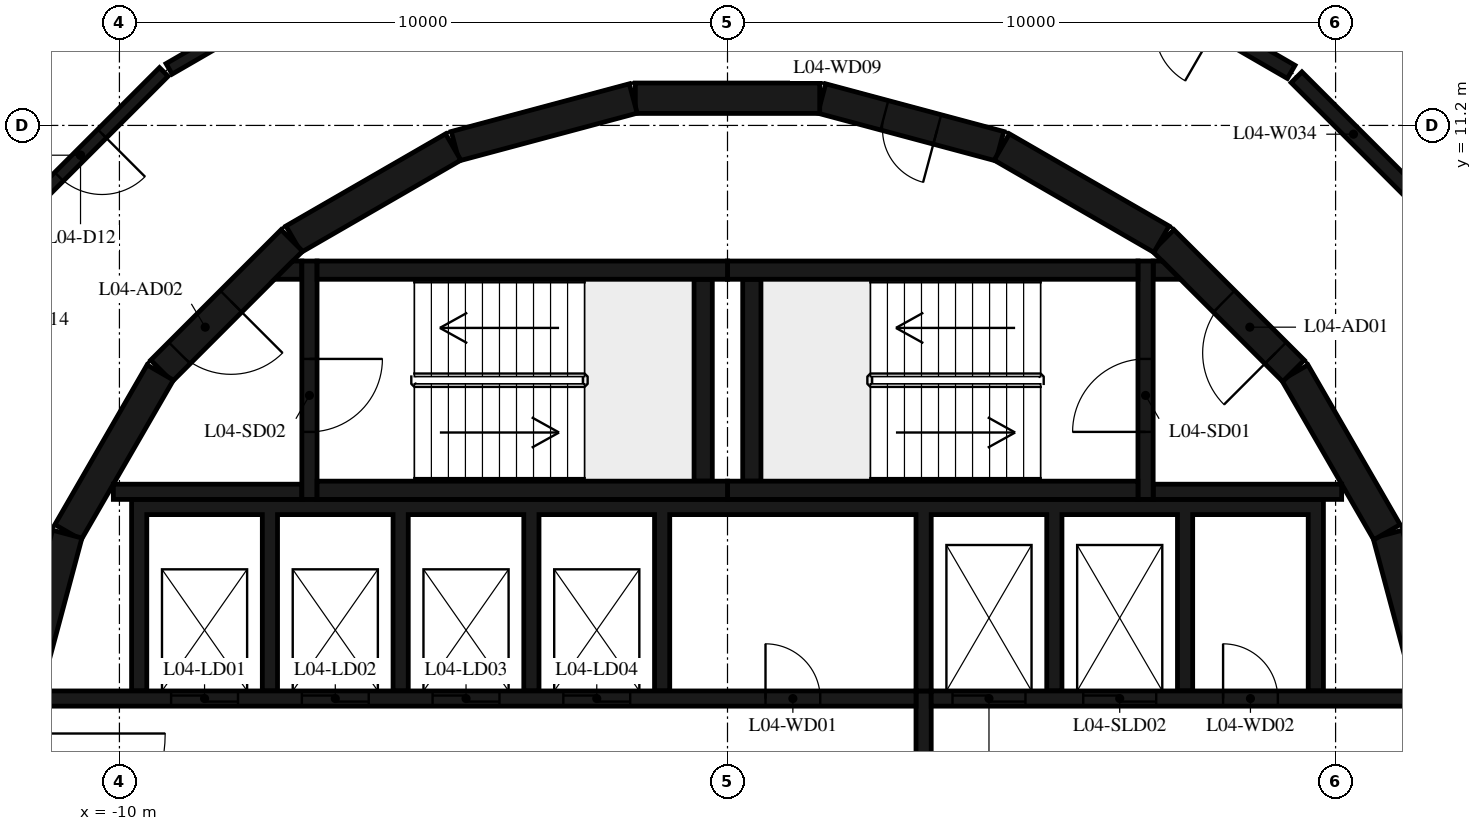
"""IFC4 building model, lengths in metres.
Left out: names, types, materials, properties, quantities, classifications, styles, units other than length and angle.
Written with IfcOpenShell. Run it as: python <this file> out.ifc"""

import sys

from ifc_helpers import new_model, si_unit, direction, frame, frame_2d, origin, place, context, subcontext, project, spatial, polyline, rectangle, outline, extrude, element, fill, save


model = new_model("IFC4")
c1 = context("Model", 3, precision=1e-05, world=origin(), true_north=direction((0.0, 1.0)))
c2 = subcontext(c1, "Body", "Model", "MODEL_VIEW")
j1 = project(units=[si_unit("LENGTHUNIT", "METRE"), si_unit("PLANEANGLEUNIT", "RADIAN")], contexts=[c1])
p1 = place(None, origin())
s1 = spatial("IfcSite", under=j1, at=p1, CompositionType="ELEMENT")
p2 = place(p1, origin())
s2 = spatial("IfcBuilding", under=s1, at=p2, CompositionType="ELEMENT")
p3 = place(p2, frame((0.0, 0.0, 23.4)))
s3 = spatial("IfcBuildingStorey", under=s2, at=p3, CompositionType="ELEMENT", Elevation=23.4)
for number, where, z_axis, x_axis in (
    (1, (11.643, 1.55, 0.0), (0.0, 0.0, 1.0), (-0.259, 0.966, 0.0)),
    (2, (10.845, 4.51, 0.0), (0.0, 0.0, 1.0), (-0.5, 0.866, 0.0)),
):
    element("IfcWall", number, at=place(p3, frame(where, z_axis=z_axis, x_axis=x_axis)), inside=s3, PredefinedType="SHEAR", context=c2, shape_type="SweptSolid", body=[
        extrude(rectangle(XDim=3.033, YDim=0.5, at=frame_2d((1.516, 0.0))), origin(), (0.0, 0.0, 1.0), 4.42),
    ])
p4 = place(p3, frame((9.308, 7.164, 0.0), z_axis=(0.0, 0.0, 1.0), x_axis=(-0.707106781187, 0.707106781187, 0.0)))
e3 = element("IfcWall", 3, at=p4, inside=s3, PredefinedType="SHEAR", context=c2, shape_type="SweptSolid", body=[
    extrude(rectangle(XDim=3.032, YDim=0.5, at=frame_2d((1.516, 0.0))), origin(), (0.0, 0.0, 1.0), 4.42),
])
p5 = place(p4, frame((0.416, 0.0, 0.0)))
e4 = element("IfcOpeningElement", 4, at=p5, cuts=e3, PredefinedType="OPENING", context=c2, shape_type="SweptSolid", body=[
    extrude(rectangle(XDim=1.2, YDim=2.1, at=frame_2d((0.6, 1.05))), frame((0.0, 0.26, 0.0), z_axis=(0.0, -1.0, 0.0), x_axis=(1.0, 0.0, 0.0)), (0.0, 0.0, 1.0), 0.52),
])
p6 = place(p3, frame((7.137, 9.329, 0.0), z_axis=(0.0, 0.0, 1.0), x_axis=(-0.865975092491, 0.500087131594, 0.0)))
e5 = element("IfcWall", 5, at=p6, inside=s3, PredefinedType="SHEAR", context=c2, shape_type="SweptSolid", body=[
    extrude(rectangle(XDim=3.033, YDim=0.5, at=frame_2d((1.516, 0.0))), origin(), (0.0, 0.0, 1.0), 4.42),
])
p7 = place(p3, frame((4.479, 10.858, 0.0), z_axis=(0.0, 0.0, 1.0), x_axis=(-0.965948410781, 0.258734743916, 0.0)))
e6 = element("IfcWall", 6, at=p7, inside=s3, PredefinedType="SHEAR", context=c2, shape_type="SweptSolid", body=[
    extrude(rectangle(XDim=3.033, YDim=0.5, at=frame_2d((1.516, 0.0))), origin(), (0.0, 0.0, 1.0), 4.42),
])
p8 = place(p7, frame((1.066, 0.0, 0.0)))
e7 = element("IfcOpeningElement", 7, at=p8, cuts=e6, PredefinedType="OPENING", context=c2, shape_type="SweptSolid", body=[
    extrude(rectangle(XDim=0.9, YDim=2.1, at=frame_2d((0.45, 1.05))), frame((0.0, 0.26, 0.0), z_axis=(0.0, -1.0, 0.0), x_axis=(1.0, 0.0, 0.0)), (0.0, 0.0, 1.0), 0.52),
])
for number, where, z_axis, x_axis in (
    (8, (1.516, 11.647, 0.0), (0.0, 0.0, 1.0), (-1.0, 0.0, 0.0)),
    (9, (-1.55, 11.643, 0.0), (0.0, 0.0, 1.0), (-0.966, -0.259, 0.0)),
    (10, (-4.51, 10.845, 0.0), (0.0, 0.0, 1.0), (-0.866, -0.5, 0.0)),
):
    element("IfcWall", number, at=place(p3, frame(where, z_axis=z_axis, x_axis=x_axis)), inside=s3, PredefinedType="SHEAR", context=c2, shape_type="SweptSolid", body=[
        extrude(rectangle(XDim=3.033, YDim=0.5, at=frame_2d((1.516, 0.0))), origin(), (0.0, 0.0, 1.0), 4.42),
    ])
p9 = place(p3, frame((-7.164, 9.308, 0.0), z_axis=(0.0, 0.0, 1.0), x_axis=(-0.707106781187, -0.707106781187, 0.0)))
e11 = element("IfcWall", 11, at=p9, inside=s3, PredefinedType="SHEAR", context=c2, shape_type="SweptSolid", body=[
    extrude(rectangle(XDim=3.032, YDim=0.5, at=frame_2d((1.516, 0.0))), origin(), (0.0, 0.0, 1.0), 4.42),
])
p10 = place(p9, frame((1.416, 0.0, 0.0)))
e12 = element("IfcOpeningElement", 12, at=p10, cuts=e11, PredefinedType="OPENING", context=c2, shape_type="SweptSolid", body=[
    extrude(rectangle(XDim=1.2, YDim=2.1, at=frame_2d((0.6, 1.05))), frame((0.0, 0.26, 0.0), z_axis=(0.0, -1.0, 0.0), x_axis=(1.0, 0.0, 0.0)), (0.0, 0.0, 1.0), 0.52),
])
for number, where, z_axis, x_axis in (
    (13, (-9.329, 7.137, 0.0), (0.0, 0.0, 1.0), (-0.5, -0.866, 0.0)),
    (14, (-10.858, 4.479, 0.0), (0.0, 0.0, 1.0), (-0.259, -0.966, 0.0)),
):
    element("IfcWall", number, at=place(p3, frame(where, z_axis=z_axis, x_axis=x_axis)), inside=s3, PredefinedType="SHEAR", context=c2, shape_type="SweptSolid", body=[
        extrude(rectangle(XDim=3.033, YDim=0.5, at=frame_2d((1.516, 0.0))), origin(), (0.0, 0.0, 1.0), 4.42),
    ])
for number, where, z_axis, x_axis in (
    (15, (0.0, 5.2, 0.0), (0.0, 0.0, 1.0), (1.0, 0.0, 0.0)),
    (16, (0.0, 8.82, 0.0), (0.0, 0.0, 1.0), (1.0, 0.0, 0.0)),
):
    element("IfcWall", number, at=place(p3, frame(where, z_axis=z_axis, x_axis=x_axis)), inside=s3, PredefinedType="SHEAR", context=c2, shape_type="SweptSolid", body=[
        extrude(rectangle(XDim=6.75, YDim=0.3, at=frame_2d((3.375, 0.0))), origin(), (0.0, 0.0, 1.0), 4.42),
    ])
p11 = place(p3, frame((0.4, 5.35, 0.0), z_axis=(0.0, 0.0, 1.0), x_axis=(0.0, 1.0, 0.0)))
e17 = element("IfcWall", 17, at=p11, inside=s3, PredefinedType="SHEAR", context=c2, shape_type="SweptSolid", body=[
    extrude(rectangle(XDim=3.32, YDim=0.3, at=frame_2d((1.66, 0.0))), origin(), (0.0, 0.0, 1.0), 4.42),
])
p12 = place(p3, frame((6.875, 5.05, 0.0), z_axis=(0.0, 0.0, 1.0), x_axis=(0.0, 1.0, 0.0)))
e18 = element("IfcWall", 18, at=p12, inside=s3, PredefinedType="SHEAR", context=c2, shape_type="SweptSolid", body=[
    extrude(rectangle(XDim=3.92, YDim=0.25, at=frame_2d((1.96, 0.0))), origin(), (0.0, 0.0, 1.0), 4.42),
])
p13 = place(p12, frame((1.11, 0.0, 0.0)))
e19 = element("IfcOpeningElement", 19, at=p13, cuts=e18, PredefinedType="OPENING", context=c2, shape_type="SweptSolid", body=[
    extrude(rectangle(XDim=1.2, YDim=2.1, at=frame_2d((0.6, 1.05))), frame((0.0, 0.135, 0.0), z_axis=(0.0, -1.0, 0.0), x_axis=(1.0, 0.0, 0.0)), (0.0, 0.0, 1.0), 0.27),
])
p14 = place(p3, frame((7.0, 5.175, 0.0), z_axis=(0.0, 0.0, 1.0), x_axis=(1.0, 0.0, 0.0)))
e20 = element("IfcWall", 20, at=p14, inside=s3, PredefinedType="SHEAR", context=c2, shape_type="SweptSolid", body=[
    extrude(rectangle(XDim=3.1, YDim=0.25, at=frame_2d((1.55, 0.0))), origin(), (0.0, 0.0, 1.0), 4.42),
])
p15 = place(p3, origin())
e21 = element("IfcWall", 21, at=p15, inside=s3, PredefinedType="SHEAR", context=c2, shape_type="SweptSolid", body=[
    extrude(outline(polyline([(7.448, 8.67), (7.0, 8.67), (7.0, 8.97), (7.148, 8.97), (7.448, 8.67)])), origin(), (0.0, 0.0, 1.0), 4.42),
])
for number, where, z_axis, x_axis in (
    (22, (-6.75, 5.2, 0.0), (0.0, 0.0, 1.0), (1.0, 0.0, 0.0)),
    (23, (-6.75, 8.82, 0.0), (0.0, 0.0, 1.0), (1.0, 0.0, 0.0)),
):
    element("IfcWall", number, at=place(p3, frame(where, z_axis=z_axis, x_axis=x_axis)), inside=s3, PredefinedType="SHEAR", context=c2, shape_type="SweptSolid", body=[
        extrude(rectangle(XDim=6.75, YDim=0.3, at=frame_2d((3.375, 0.0))), origin(), (0.0, 0.0, 1.0), 4.42),
    ])
p16 = place(p3, frame((-0.4, 5.35, 0.0), z_axis=(0.0, 0.0, 1.0), x_axis=(0.0, 1.0, 0.0)))
e24 = element("IfcWall", 24, at=p16, inside=s3, PredefinedType="SHEAR", context=c2, shape_type="SweptSolid", body=[
    extrude(rectangle(XDim=3.32, YDim=0.3, at=frame_2d((1.66, 0.0))), origin(), (0.0, 0.0, 1.0), 4.42),
])
p17 = place(p3, frame((-6.875, 8.97, 0.0), z_axis=(0.0, 0.0, 1.0), x_axis=(0.0, -1.0, 0.0)))
e25 = element("IfcWall", 25, at=p17, inside=s3, PredefinedType="SHEAR", context=c2, shape_type="SweptSolid", body=[
    extrude(rectangle(XDim=3.92, YDim=0.25, at=frame_2d((1.96, 0.0))), origin(), (0.0, 0.0, 1.0), 4.42),
])
p18 = place(p17, frame((1.61, 0.0, 0.0)))
e26 = element("IfcOpeningElement", 26, at=p18, cuts=e25, PredefinedType="OPENING", context=c2, shape_type="SweptSolid", body=[
    extrude(rectangle(XDim=1.2, YDim=2.1, at=frame_2d((0.6, 1.05))), frame((0.0, 0.135, 0.0), z_axis=(0.0, -1.0, 0.0), x_axis=(1.0, 0.0, 0.0)), (0.0, 0.0, 1.0), 0.27),
])
p19 = place(p3, frame((-7.0, 5.175, 0.0), z_axis=(0.0, 0.0, 1.0), x_axis=(-1.0, 0.0, 0.0)))
e27 = element("IfcWall", 27, at=p19, inside=s3, PredefinedType="SHEAR", context=c2, shape_type="SweptSolid", body=[
    extrude(rectangle(XDim=3.1, YDim=0.25, at=frame_2d((1.55, 0.0))), origin(), (0.0, 0.0, 1.0), 4.42),
])
p20 = place(p3, origin())
e28 = element("IfcWall", 28, at=p20, inside=s3, PredefinedType="SHEAR", context=c2, shape_type="SweptSolid", body=[
    extrude(outline(polyline([(-7.148, 8.97), (-7.0, 8.97), (-7.0, 8.67), (-7.448, 8.67), (-7.148, 8.97)])), origin(), (0.0, 0.0, 1.0), 4.42),
])
p21 = place(p3, origin())
e29 = element("IfcWall", 29, at=p21, inside=s3, PredefinedType="SHEAR", context=c2, shape_type="SweptSolid", body=[
    extrude(outline(polyline([(-9.55, 4.8), (-7.65, 4.8), (-7.65, 1.9), (-7.4, 1.9), (-7.4, 4.8), (-5.5, 4.8), (-5.5, 1.9), (-5.25, 1.9), (-5.25, 4.8), (-3.35, 4.8), (-3.35, 1.9), (-3.1, 1.9), (-3.1, 4.8), (-1.2, 4.8), (-1.2, 1.9), (-0.95, 1.9), (-0.95, 4.8), (3.1, 4.8), (3.1, 1.9), (3.35, 1.9), (3.35, 4.8), (5.25, 4.8), (5.25, 1.9), (5.5, 1.9), (5.5, 4.8), (7.4, 4.8), (7.4, 1.9), (7.65, 1.9), (7.65, 4.8), (9.55, 4.8), (9.55, 1.9), (9.8, 1.9), (9.8, 4.8), (9.8, 5.05), (-9.8, 5.05), (-9.8, 4.8), (-9.8, 1.9), (-9.55, 1.9), (-9.55, 4.8)])), origin(), (0.0, 0.0, 1.0), 4.42),
])
p22 = place(p3, frame((-11.28, 1.775, 0.0), z_axis=(0.0, 0.0, 1.0), x_axis=(1.0, 0.0, 0.0)))
e30 = element("IfcWall", 30, at=p22, inside=s3, PredefinedType="SHEAR", context=c2, shape_type="SweptSolid", body=[
    extrude(rectangle(XDim=14.38, YDim=0.25, at=frame_2d((7.19, 0.0))), origin(), (0.0, 0.0, 1.0), 4.42),
])
p23 = place(p22, frame((2.13, 0.0, 0.0)))
e31 = element("IfcOpeningElement", 31, at=p23, cuts=e30, PredefinedType="OPENING", context=c2, shape_type="SweptSolid", body=[
    extrude(rectangle(XDim=1.1, YDim=2.1, at=frame_2d((0.55, 1.05))), frame((0.0, 0.135, 0.0), z_axis=(0.0, -1.0, 0.0), x_axis=(1.0, 0.0, 0.0)), (0.0, 0.0, 1.0), 0.27),
])
p24 = place(p22, frame((4.28, 0.0, 0.0)))
e32 = element("IfcOpeningElement", 32, at=p24, cuts=e30, PredefinedType="OPENING", context=c2, shape_type="SweptSolid", body=[
    extrude(rectangle(XDim=1.1, YDim=2.1, at=frame_2d((0.55, 1.05))), frame((0.0, 0.135, 0.0), z_axis=(0.0, -1.0, 0.0), x_axis=(1.0, 0.0, 0.0)), (0.0, 0.0, 1.0), 0.27),
])
p25 = place(p22, frame((6.43, 0.0, 0.0)))
e33 = element("IfcOpeningElement", 33, at=p25, cuts=e30, PredefinedType="OPENING", context=c2, shape_type="SweptSolid", body=[
    extrude(rectangle(XDim=1.1, YDim=2.1, at=frame_2d((0.55, 1.05))), frame((0.0, 0.135, 0.0), z_axis=(0.0, -1.0, 0.0), x_axis=(1.0, 0.0, 0.0)), (0.0, 0.0, 1.0), 0.27),
])
p26 = place(p22, frame((8.58, 0.0, 0.0)))
e34 = element("IfcOpeningElement", 34, at=p26, cuts=e30, PredefinedType="OPENING", context=c2, shape_type="SweptSolid", body=[
    extrude(rectangle(XDim=1.1, YDim=2.1, at=frame_2d((0.55, 1.05))), frame((0.0, 0.135, 0.0), z_axis=(0.0, -1.0, 0.0), x_axis=(1.0, 0.0, 0.0)), (0.0, 0.0, 1.0), 0.27),
])
p27 = place(p22, frame((11.905, 0.0, 0.0)))
e35 = element("IfcOpeningElement", 35, at=p27, cuts=e30, PredefinedType="OPENING", context=c2, shape_type="SweptSolid", body=[
    extrude(rectangle(XDim=0.9, YDim=2.1, at=frame_2d((0.45, 1.05))), frame((0.0, 0.135, 0.0), z_axis=(0.0, -1.0, 0.0), x_axis=(1.0, 0.0, 0.0)), (0.0, 0.0, 1.0), 0.27),
])
p28 = place(p3, frame((3.35, 1.775, 0.0), z_axis=(0.0, 0.0, 1.0), x_axis=(1.0, 0.0, 0.0)))
e36 = element("IfcWall", 36, at=p28, inside=s3, PredefinedType="SHEAR", context=c2, shape_type="SweptSolid", body=[
    extrude(rectangle(XDim=7.93, YDim=0.25, at=frame_2d((3.965, 0.0))), origin(), (0.0, 0.0, 1.0), 4.42),
])
p29 = place(p28, frame((0.35, 0.0, 0.0)))
e37 = element("IfcOpeningElement", 37, at=p29, cuts=e36, PredefinedType="OPENING", context=c2, shape_type="SweptSolid", body=[
    extrude(rectangle(XDim=1.2, YDim=2.4, at=frame_2d((0.6, 1.2))), frame((0.0, 0.135, 0.0), z_axis=(0.0, -1.0, 0.0), x_axis=(1.0, 0.0, 0.0)), (0.0, 0.0, 1.0), 0.27),
])
p30 = place(p28, frame((2.5, 0.0, 0.0)))
e38 = element("IfcOpeningElement", 38, at=p30, cuts=e36, PredefinedType="OPENING", context=c2, shape_type="SweptSolid", body=[
    extrude(rectangle(XDim=1.2, YDim=2.4, at=frame_2d((0.6, 1.2))), frame((0.0, 0.135, 0.0), z_axis=(0.0, -1.0, 0.0), x_axis=(1.0, 0.0, 0.0)), (0.0, 0.0, 1.0), 0.27),
])
p31 = place(p28, frame((4.8, 0.0, 0.0)))
e39 = element("IfcOpeningElement", 39, at=p31, cuts=e36, PredefinedType="OPENING", context=c2, shape_type="SweptSolid", body=[
    extrude(rectangle(XDim=0.9, YDim=2.1, at=frame_2d((0.45, 1.05))), frame((0.0, 0.135, 0.0), z_axis=(0.0, -1.0, 0.0), x_axis=(1.0, 0.0, 0.0)), (0.0, 0.0, 1.0), 0.27),
])
p32 = place(p3, frame((3.225, -1.9, 0.0), z_axis=(0.0, 0.0, 1.0), x_axis=(0.0, 1.0, 0.0)))
e40 = element("IfcWall", 40, at=p32, inside=s3, PredefinedType="SHEAR", context=c2, shape_type="SweptSolid", body=[
    extrude(rectangle(XDim=3.8, YDim=0.25, at=frame_2d((1.9, 0.0))), origin(), (0.0, 0.0, 1.0), 4.42),
])
p33 = place(p3, frame((-9.27, 12.08, 0.0), z_axis=(0.0, 0.0, 1.0), x_axis=(-0.707106781187, -0.707106781187, 0.0)))
e41 = element("IfcWall", 41, at=p33, inside=s3, PredefinedType="PARTITIONING", context=c2, shape_type="SweptSolid", body=[
    extrude(rectangle(XDim=3.874, YDim=0.2, at=frame_2d((1.937, 0.0))), origin(), (0.0, 0.0, 1.0), 4.42),
])
p34 = place(p33, frame((1.437, 0.0, 0.0)))
e42 = element("IfcOpeningElement", 42, at=p34, cuts=e41, PredefinedType="OPENING", context=c2, shape_type="SweptSolid", body=[
    extrude(rectangle(XDim=1.0, YDim=2.1, at=frame_2d((0.5, 1.05))), frame((0.0, 0.11, 0.0), z_axis=(0.0, -1.0, 0.0), x_axis=(1.0, 0.0, 0.0)), (0.0, 0.0, 1.0), 0.22),
])
p35 = place(p3, frame((-5.917, 14.02, 0.0), z_axis=(0.0, 0.0, 1.0), x_axis=(-0.865591582237, -0.500750649286, 0.0)))
e43 = element("IfcWall", 43, at=p35, inside=s3, PredefinedType="PARTITIONING", context=c2, shape_type="SweptSolid", body=[
    extrude(rectangle(XDim=3.774, YDim=0.2, at=frame_2d((1.887, 0.0))), origin(), (0.0, 0.0, 1.0), 4.42),
])
p36 = place(p3, frame((9.27, 12.08, 0.0), z_axis=(0.0, 0.0, 1.0), x_axis=(-0.865601686425, 0.500733182901, 0.0)))
e44 = element("IfcWall", 44, at=p36, inside=s3, PredefinedType="PARTITIONING", context=c2, shape_type="SweptSolid", body=[
    extrude(rectangle(XDim=3.874, YDim=0.25, at=frame_2d((1.937, 0.0))), origin(), (0.0, 0.0, 1.0), 4.42),
])
p37 = place(p36, frame((1.437, 0.0, 0.0)))
e45 = element("IfcOpeningElement", 45, at=p37, cuts=e44, PredefinedType="OPENING", context=c2, shape_type="SweptSolid", body=[
    extrude(rectangle(XDim=1.0, YDim=2.1, at=frame_2d((0.5, 1.05))), frame((0.0, 0.135, 0.0), z_axis=(0.0, -1.0, 0.0), x_axis=(1.0, 0.0, 0.0)), (0.0, 0.0, 1.0), 0.27),
])
p38 = place(p3, frame((11.23, 10.12, 0.0), z_axis=(0.0, 0.0, 1.0), x_axis=(-0.707106781187, 0.707106781187, 0.0)))
e46 = element("IfcWall", 46, at=p38, inside=s3, PredefinedType="PARTITIONING", context=c2, shape_type="SweptSolid", body=[
    extrude(rectangle(XDim=2.647, YDim=0.25, at=frame_2d((1.323, 0.0))), origin(), (0.0, 0.0, 1.0), 4.42),
])
p39 = place(p13, origin())
e47 = element("IfcDoor", 47, at=p39, inside=s3, OperationType="SINGLE_SWING_LEFT", PredefinedType="DOOR", context=c2, shape_type="SweptSolid", body=[
    extrude(rectangle(XDim=1.2, YDim=2.1, at=frame_2d((0.6, 1.05))), frame((0.0, 0.025, 0.0), z_axis=(0.0, -1.0, 0.0), x_axis=(1.0, 0.0, 0.0)), (0.0, 0.0, 1.0), 0.05),
])
fill(e19, e47)
p40 = place(p5, origin())
e48 = element("IfcDoor", 48, at=p40, inside=s3, OperationType="SINGLE_SWING_RIGHT", PredefinedType="DOOR", context=c2, shape_type="SweptSolid", body=[
    extrude(rectangle(XDim=1.2, YDim=2.1, at=frame_2d((0.6, 1.05))), frame((0.0, 0.025, 0.0), z_axis=(0.0, -1.0, 0.0), x_axis=(1.0, 0.0, 0.0)), (0.0, 0.0, 1.0), 0.05),
])
fill(e4, e48)
p41 = place(p18, origin())
e49 = element("IfcDoor", 49, at=p41, inside=s3, OperationType="SINGLE_SWING_LEFT", PredefinedType="DOOR", context=c2, shape_type="SweptSolid", body=[
    extrude(rectangle(XDim=1.2, YDim=2.1, at=frame_2d((0.6, 1.05))), frame((0.0, 0.025, 0.0), z_axis=(0.0, -1.0, 0.0), x_axis=(1.0, 0.0, 0.0)), (0.0, 0.0, 1.0), 0.05),
])
fill(e26, e49)
p42 = place(p10, origin())
e50 = element("IfcDoor", 50, at=p42, inside=s3, OperationType="SINGLE_SWING_RIGHT", PredefinedType="DOOR", context=c2, shape_type="SweptSolid", body=[
    extrude(rectangle(XDim=1.2, YDim=2.1, at=frame_2d((0.6, 1.05))), frame((0.0, 0.025, 0.0), z_axis=(0.0, -1.0, 0.0), x_axis=(1.0, 0.0, 0.0)), (0.0, 0.0, 1.0), 0.05),
])
fill(e12, e50)
p43 = place(p23, origin())
e51 = element("IfcDoor", 51, at=p43, inside=s3, OperationType="DOUBLE_DOOR_SLIDING", PredefinedType="DOOR", context=c2, shape_type="SweptSolid", body=[
    extrude(rectangle(XDim=1.1, YDim=2.1, at=frame_2d((0.55, 1.05))), frame((0.0, 0.025, 0.0), z_axis=(0.0, -1.0, 0.0), x_axis=(1.0, 0.0, 0.0)), (0.0, 0.0, 1.0), 0.05),
])
fill(e31, e51)
p44 = place(p24, origin())
e52 = element("IfcDoor", 52, at=p44, inside=s3, OperationType="DOUBLE_DOOR_SLIDING", PredefinedType="DOOR", context=c2, shape_type="SweptSolid", body=[
    extrude(rectangle(XDim=1.1, YDim=2.1, at=frame_2d((0.55, 1.05))), frame((0.0, 0.025, 0.0), z_axis=(0.0, -1.0, 0.0), x_axis=(1.0, 0.0, 0.0)), (0.0, 0.0, 1.0), 0.05),
])
fill(e32, e52)
p45 = place(p25, origin())
e53 = element("IfcDoor", 53, at=p45, inside=s3, OperationType="DOUBLE_DOOR_SLIDING", PredefinedType="DOOR", context=c2, shape_type="SweptSolid", body=[
    extrude(rectangle(XDim=1.1, YDim=2.1, at=frame_2d((0.55, 1.05))), frame((0.0, 0.025, 0.0), z_axis=(0.0, -1.0, 0.0), x_axis=(1.0, 0.0, 0.0)), (0.0, 0.0, 1.0), 0.05),
])
fill(e33, e53)
p46 = place(p26, origin())
e54 = element("IfcDoor", 54, at=p46, inside=s3, OperationType="DOUBLE_DOOR_SLIDING", PredefinedType="DOOR", context=c2, shape_type="SweptSolid", body=[
    extrude(rectangle(XDim=1.1, YDim=2.1, at=frame_2d((0.55, 1.05))), frame((0.0, 0.025, 0.0), z_axis=(0.0, -1.0, 0.0), x_axis=(1.0, 0.0, 0.0)), (0.0, 0.0, 1.0), 0.05),
])
fill(e34, e54)
p47 = place(p29, origin())
e55 = element("IfcDoor", 55, at=p47, inside=s3, OperationType="DOUBLE_DOOR_SLIDING", PredefinedType="DOOR", context=c2, shape_type="SweptSolid", body=[
    extrude(rectangle(XDim=1.2, YDim=2.4, at=frame_2d((0.6, 1.2))), frame((0.0, 0.025, 0.0), z_axis=(0.0, -1.0, 0.0), x_axis=(1.0, 0.0, 0.0)), (0.0, 0.0, 1.0), 0.05),
])
fill(e37, e55)
p48 = place(p30, origin())
e56 = element("IfcDoor", 56, at=p48, inside=s3, OperationType="DOUBLE_DOOR_SLIDING", PredefinedType="DOOR", context=c2, shape_type="SweptSolid", body=[
    extrude(rectangle(XDim=1.2, YDim=2.4, at=frame_2d((0.6, 1.2))), frame((0.0, 0.025, 0.0), z_axis=(0.0, -1.0, 0.0), x_axis=(1.0, 0.0, 0.0)), (0.0, 0.0, 1.0), 0.05),
])
fill(e38, e56)
p49 = place(p27, origin())
e57 = element("IfcDoor", 57, at=p49, inside=s3, OperationType="SINGLE_SWING_RIGHT", PredefinedType="DOOR", context=c2, shape_type="SweptSolid", body=[
    extrude(rectangle(XDim=0.9, YDim=2.1, at=frame_2d((0.45, 1.05))), frame((0.0, 0.025, 0.0), z_axis=(0.0, -1.0, 0.0), x_axis=(1.0, 0.0, 0.0)), (0.0, 0.0, 1.0), 0.05),
])
fill(e35, e57)
p50 = place(p31, origin())
e58 = element("IfcDoor", 58, at=p50, inside=s3, OperationType="SINGLE_SWING_LEFT", PredefinedType="DOOR", context=c2, shape_type="SweptSolid", body=[
    extrude(rectangle(XDim=0.9, YDim=2.1, at=frame_2d((0.45, 1.05))), frame((0.0, 0.025, 0.0), z_axis=(0.0, -1.0, 0.0), x_axis=(1.0, 0.0, 0.0)), (0.0, 0.0, 1.0), 0.05),
])
fill(e39, e58)
p51 = place(p8, origin())
e59 = element("IfcDoor", 59, at=p51, inside=s3, OperationType="SINGLE_SWING_RIGHT", PredefinedType="DOOR", context=c2, shape_type="SweptSolid", body=[
    extrude(rectangle(XDim=0.9, YDim=2.1, at=frame_2d((0.45, 1.05))), frame((0.0, 0.025, 0.0), z_axis=(0.0, -1.0, 0.0), x_axis=(1.0, 0.0, 0.0)), (0.0, 0.0, 1.0), 0.05),
])
fill(e7, e59)
p52 = place(p34, origin())
e60 = element("IfcDoor", 60, at=p52, inside=s3, OperationType="SINGLE_SWING_LEFT", PredefinedType="DOOR", context=c2, shape_type="SweptSolid", body=[
    extrude(rectangle(XDim=1.0, YDim=2.1, at=frame_2d((0.5, 1.05))), frame((0.0, 0.025, 0.0), z_axis=(0.0, -1.0, 0.0), x_axis=(1.0, 0.0, 0.0)), (0.0, 0.0, 1.0), 0.05),
])
fill(e42, e60)
save(model, sys.argv[1])
